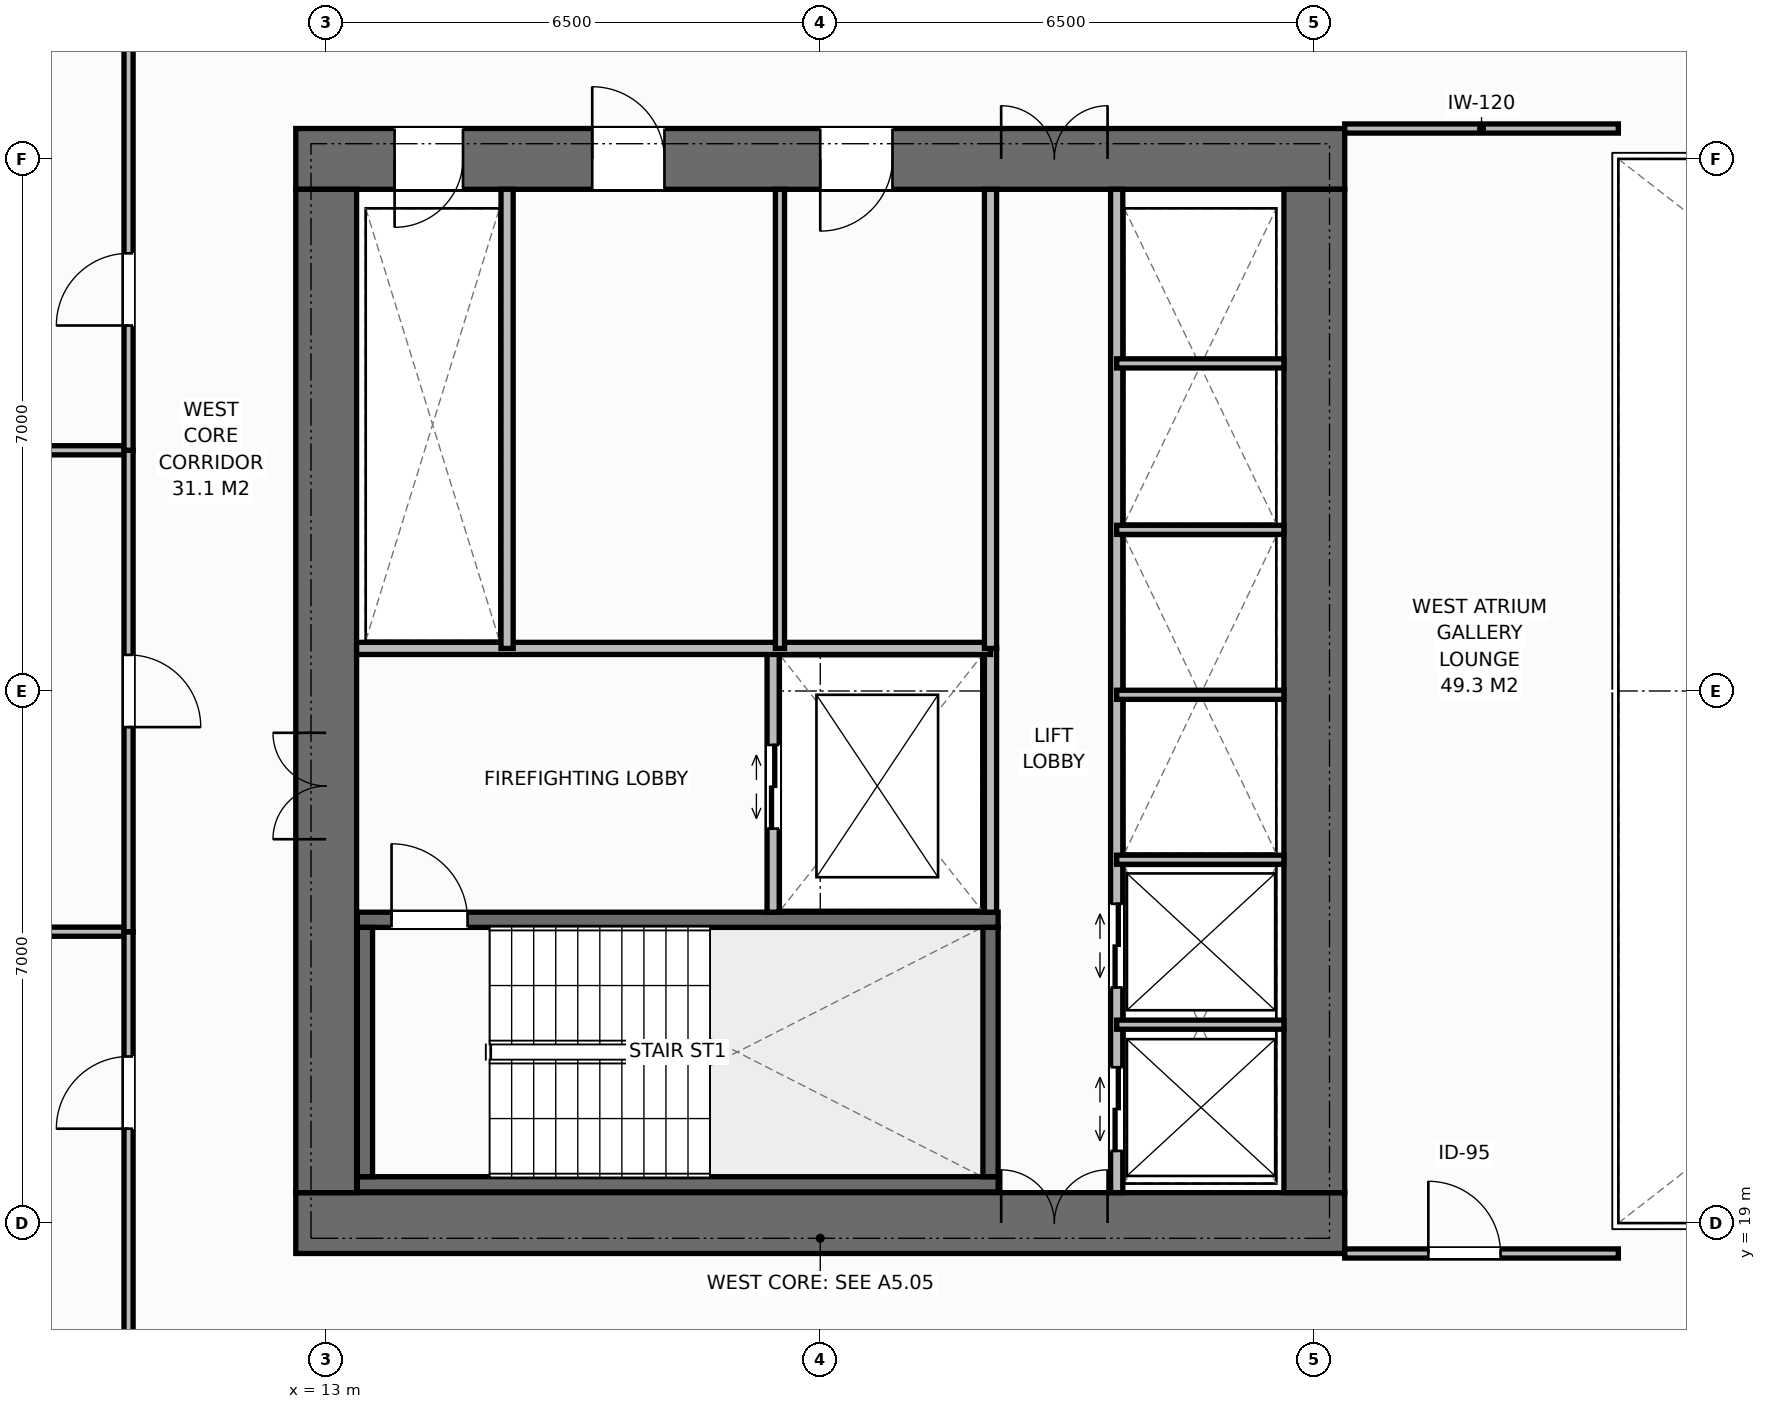
"""IFC4 building model, lengths in metres.
Left out: names, types, materials, properties, quantities, classifications, styles, units other than length and angle.
Written with IfcOpenShell. Run it as: python <this file> out.ifc"""

import sys

from ifc_helpers import new_model, si_unit, direction, frame, frame_2d, origin, place, context, subcontext, project, spatial, rectangle, extrude, element, fill, save


model = new_model("IFC4")
c1 = context("Model", 3, precision=1e-05, world=origin(), true_north=direction((0.0, 1.0)))
c2 = subcontext(c1, "Body", "Model", "MODEL_VIEW")
j1 = project(units=[si_unit("LENGTHUNIT", "METRE"), si_unit("PLANEANGLEUNIT", "RADIAN")], contexts=[c1])
p1 = place(None, origin())
s1 = spatial("IfcSite", under=j1, at=p1, CompositionType="ELEMENT")
p2 = place(p1, origin())
s2 = spatial("IfcBuilding", under=s1, at=p2, CompositionType="ELEMENT")
p3 = place(p2, frame((0.0, 0.0, 50.6)))
s3 = spatial("IfcBuildingStorey", under=s2, at=p3, CompositionType="ELEMENT", Elevation=50.6)
p4 = place(p3, frame((12.6, 19.0, 0.0), z_axis=(0.0, 0.0, 1.0), x_axis=(1.0, 0.0, 0.0)))
e1 = element("IfcWall", 1, at=p4, inside=s3, PredefinedType="SHEAR", context=c2, shape_type="SweptSolid", body=[
    extrude(rectangle(XDim=13.8, YDim=0.8, at=frame_2d((6.9, 0.0))), origin(), (0.0, 0.0, 1.0), 3.8),
])
p5 = place(p4, frame((9.28, 0.0, 0.0)))
e2 = element("IfcOpeningElement", 2, at=p5, cuts=e1, PredefinedType="OPENING", context=c2, shape_type="SweptSolid", body=[
    extrude(rectangle(XDim=1.4, YDim=2.2, at=frame_2d((0.7, 1.1))), frame((0.0, 0.41, 0.0), z_axis=(0.0, -1.0, 0.0), x_axis=(1.0, 0.0, 0.0)), (0.0, 0.0, 1.0), 0.82),
])
p6 = place(p3, frame((12.6, 33.0, 0.0), z_axis=(0.0, 0.0, 1.0), x_axis=(1.0, 0.0, 0.0)))
e3 = element("IfcWall", 3, at=p6, inside=s3, PredefinedType="SHEAR", context=c2, shape_type="SweptSolid", body=[
    extrude(rectangle(XDim=13.8, YDim=0.8, at=frame_2d((6.9, 0.0))), origin(), (0.0, 0.0, 1.0), 3.8),
])
p7 = place(p6, frame((1.3, 0.0, 0.0)))
e4 = element("IfcOpeningElement", 4, at=p7, cuts=e3, PredefinedType="OPENING", context=c2, shape_type="SweptSolid", body=[
    extrude(rectangle(XDim=0.9, YDim=2.15, at=frame_2d((0.45, 1.075))), frame((0.0, 0.41, 0.0), z_axis=(0.0, -1.0, 0.0), x_axis=(1.0, 0.0, 0.0)), (0.0, 0.0, 1.0), 0.82),
])
p8 = place(p6, frame((3.9, 0.0, 0.0)))
e5 = element("IfcOpeningElement", 5, at=p8, cuts=e3, PredefinedType="OPENING", context=c2, shape_type="SweptSolid", body=[
    extrude(rectangle(XDim=0.95, YDim=2.15, at=frame_2d((0.475, 1.075))), frame((0.0, 0.41, 0.0), z_axis=(0.0, -1.0, 0.0), x_axis=(1.0, 0.0, 0.0)), (0.0, 0.0, 1.0), 0.82),
])
p9 = place(p6, frame((6.9, 0.0, 0.0)))
e6 = element("IfcOpeningElement", 6, at=p9, cuts=e3, PredefinedType="OPENING", context=c2, shape_type="SweptSolid", body=[
    extrude(rectangle(XDim=0.95, YDim=2.15, at=frame_2d((0.475, 1.075))), frame((0.0, 0.41, 0.0), z_axis=(0.0, -1.0, 0.0), x_axis=(1.0, 0.0, 0.0)), (0.0, 0.0, 1.0), 0.82),
])
p10 = place(p6, frame((9.28, 0.0, 0.0)))
e7 = element("IfcOpeningElement", 7, at=p10, cuts=e3, PredefinedType="OPENING", context=c2, shape_type="SweptSolid", body=[
    extrude(rectangle(XDim=1.4, YDim=2.2, at=frame_2d((0.7, 1.1))), frame((0.0, 0.41, 0.0), z_axis=(0.0, -1.0, 0.0), x_axis=(1.0, 0.0, 0.0)), (0.0, 0.0, 1.0), 0.82),
])
p11 = place(p3, frame((13.0, 19.4, 0.0), z_axis=(0.0, 0.0, 1.0), x_axis=(0.0, 1.0, 0.0)))
e8 = element("IfcWall", 8, at=p11, inside=s3, PredefinedType="SHEAR", context=c2, shape_type="SweptSolid", body=[
    extrude(rectangle(XDim=13.2, YDim=0.8, at=frame_2d((6.6, 0.0))), origin(), (0.0, 0.0, 1.0), 3.8),
])
p12 = place(p11, frame((4.65, 0.0, 0.0)))
e9 = element("IfcOpeningElement", 9, at=p12, cuts=e8, PredefinedType="OPENING", context=c2, shape_type="SweptSolid", body=[
    extrude(rectangle(XDim=1.4, YDim=2.2, at=frame_2d((0.7, 1.1))), frame((0.0, 0.41, 0.0), z_axis=(0.0, -1.0, 0.0), x_axis=(1.0, 0.0, 0.0)), (0.0, 0.0, 1.0), 0.82),
])
p13 = place(p3, frame((26.0, 19.4, 0.0), z_axis=(0.0, 0.0, 1.0), x_axis=(0.0, 1.0, 0.0)))
e10 = element("IfcWall", 10, at=p13, inside=s3, PredefinedType="SHEAR", context=c2, shape_type="SweptSolid", body=[
    extrude(rectangle(XDim=13.2, YDim=0.8, at=frame_2d((6.6, 0.0))), origin(), (0.0, 0.0, 1.0), 3.8),
])
p14 = place(p3, frame((13.41, 19.51, 0.0), z_axis=(0.0, 0.0, 1.0), x_axis=(1.0, 0.0, 0.0)))
e11 = element("IfcWall", 11, at=p14, inside=s3, PredefinedType="SHEAR", context=c2, shape_type="SweptSolid", body=[
    extrude(rectangle(XDim=8.43, YDim=0.2, at=frame_2d((4.215, 0.0))), origin(), (0.0, 0.0, 1.0), 3.8),
])
p15 = place(p3, frame((13.41, 22.99, 0.0), z_axis=(0.0, 0.0, 1.0), x_axis=(1.0, 0.0, 0.0)))
e12 = element("IfcWall", 12, at=p15, inside=s3, PredefinedType="SHEAR", context=c2, shape_type="SweptSolid", body=[
    extrude(rectangle(XDim=8.43, YDim=0.2, at=frame_2d((4.215, 0.0))), origin(), (0.0, 0.0, 1.0), 3.8),
])
p16 = place(p15, frame((0.45, 0.0, 0.0)))
e13 = element("IfcOpeningElement", 13, at=p16, cuts=e12, PredefinedType="OPENING", context=c2, shape_type="SweptSolid", body=[
    extrude(rectangle(XDim=1.0, YDim=2.15, at=frame_2d((0.5, 1.075))), frame((0.0, 0.11, 0.0), z_axis=(0.0, -1.0, 0.0), x_axis=(1.0, 0.0, 0.0)), (0.0, 0.0, 1.0), 0.22),
])
for number, where, z_axis, x_axis in (
    (14, (13.51, 19.61, 0.0), (0.0, 0.0, 1.0), (0.0, 1.0, 0.0)),
    (15, (21.74, 19.61, 0.0), (0.0, 0.0, 1.0), (0.0, 1.0, 0.0)),
):
    element("IfcWall", number, at=place(p3, frame(where, z_axis=z_axis, x_axis=x_axis)), inside=s3, PredefinedType="SHEAR", context=c2, shape_type="SweptSolid", body=[
        extrude(rectangle(XDim=3.28, YDim=0.2, at=frame_2d((1.64, 0.0))), origin(), (0.0, 0.0, 1.0), 3.8),
    ])
p17 = place(p3, frame((21.74, 23.09, 0.0), z_axis=(0.0, 0.0, 1.0), x_axis=(0.0, 1.0, 0.0)))
e16 = element("IfcWall", 16, at=p17, inside=s3, PredefinedType="STANDARD", context=c2, shape_type="SweptSolid", body=[
    extrude(rectangle(XDim=3.47, YDim=0.16, at=frame_2d((1.735, 0.0))), origin(), (0.0, 0.0, 1.0), 3.55),
])
p18 = place(p3, frame((18.88, 23.09, 0.0), z_axis=(0.0, 0.0, 1.0), x_axis=(0.0, 1.0, 0.0)))
e17 = element("IfcWall", 17, at=p18, inside=s3, PredefinedType="STANDARD", context=c2, shape_type="SweptSolid", body=[
    extrude(rectangle(XDim=3.47, YDim=0.16, at=frame_2d((1.735, 0.0))), origin(), (0.0, 0.0, 1.0), 3.55),
])
p19 = place(p18, frame((1.1, 0.0, 0.0)))
e18 = element("IfcOpeningElement", 18, at=p19, cuts=e17, PredefinedType="OPENING", context=c2, shape_type="SweptSolid", body=[
    extrude(rectangle(XDim=1.1, YDim=2.2, at=frame_2d((0.55, 1.1))), frame((0.0, 0.09, 0.0), z_axis=(0.0, -1.0, 0.0), x_axis=(1.0, 0.0, 0.0)), (0.0, 0.0, 1.0), 0.18),
])
p20 = place(p3, frame((13.4, 26.56, 0.0), z_axis=(0.0, 0.0, 1.0), x_axis=(1.0, 0.0, 0.0)))
e19 = element("IfcWall", 19, at=p20, inside=s3, PredefinedType="STANDARD", context=c2, shape_type="SweptSolid", body=[
    extrude(rectangle(XDim=8.34, YDim=0.16, at=frame_2d((4.17, 0.0))), origin(), (0.0, 0.0, 1.0), 3.55),
])
p21 = place(p3, frame((15.38, 26.56, 0.0), z_axis=(0.0, 0.0, 1.0), x_axis=(0.0, 1.0, 0.0)))
e20 = element("IfcWall", 20, at=p21, inside=s3, PredefinedType="STANDARD", context=c2, shape_type="SweptSolid", body=[
    extrude(rectangle(XDim=6.04, YDim=0.16, at=frame_2d((3.02, 0.0))), origin(), (0.0, 0.0, 1.0), 3.55),
])
p22 = place(p3, frame((18.97, 26.56, 0.0), z_axis=(0.0, 0.0, 1.0), x_axis=(0.0, 1.0, 0.0)))
e21 = element("IfcWall", 21, at=p22, inside=s3, PredefinedType="PARTITIONING", context=c2, shape_type="SweptSolid", body=[
    extrude(rectangle(XDim=6.04, YDim=0.12, at=frame_2d((3.02, 0.0))), origin(), (0.0, 0.0, 1.0), 3.55),
])
p23 = place(p3, frame((21.74, 26.56, 0.0), z_axis=(0.0, 0.0, 1.0), x_axis=(0.0, 1.0, 0.0)))
e22 = element("IfcWall", 22, at=p23, inside=s3, PredefinedType="STANDARD", context=c2, shape_type="SweptSolid", body=[
    extrude(rectangle(XDim=6.04, YDim=0.16, at=frame_2d((3.02, 0.0))), origin(), (0.0, 0.0, 1.0), 3.55),
])
p24 = place(p3, frame((23.4, 19.4, 0.0), z_axis=(0.0, 0.0, 1.0), x_axis=(0.0, 1.0, 0.0)))
e23 = element("IfcWall", 23, at=p24, inside=s3, PredefinedType="STANDARD", context=c2, shape_type="SweptSolid", body=[
    extrude(rectangle(XDim=13.2, YDim=0.16, at=frame_2d((6.6, 0.0))), origin(), (0.0, 0.0, 1.0), 3.55),
])
p25 = place(p24, frame((0.55, 0.0, 0.0)))
e24 = element("IfcOpeningElement", 24, at=p25, cuts=e23, PredefinedType="OPENING", context=c2, shape_type="SweptSolid", body=[
    extrude(rectangle(XDim=1.1, YDim=2.2, at=frame_2d((0.55, 1.1))), frame((0.0, 0.09, 0.0), z_axis=(0.0, -1.0, 0.0), x_axis=(1.0, 0.0, 0.0)), (0.0, 0.0, 1.0), 0.18),
])
p26 = place(p24, frame((2.7, 0.0, 0.0)))
e25 = element("IfcOpeningElement", 25, at=p26, cuts=e23, PredefinedType="OPENING", context=c2, shape_type="SweptSolid", body=[
    extrude(rectangle(XDim=1.1, YDim=2.2, at=frame_2d((0.55, 1.1))), frame((0.0, 0.09, 0.0), z_axis=(0.0, -1.0, 0.0), x_axis=(1.0, 0.0, 0.0)), (0.0, 0.0, 1.0), 0.18),
])
for number, where, z_axis, x_axis in (
    (26, (23.4, 21.61, 0.0), (0.0, 0.0, 1.0), (1.0, 0.0, 0.0)),
    (27, (23.4, 23.78, 0.0), (0.0, 0.0, 1.0), (1.0, 0.0, 0.0)),
    (28, (23.4, 25.95, 0.0), (0.0, 0.0, 1.0), (1.0, 0.0, 0.0)),
    (29, (23.4, 28.12, 0.0), (0.0, 0.0, 1.0), (1.0, 0.0, 0.0)),
    (30, (23.4, 30.31, 0.0), (0.0, 0.0, 1.0), (1.0, 0.0, 0.0)),
):
    element("IfcWall", number, at=place(p3, frame(where, z_axis=z_axis, x_axis=x_axis)), inside=s3, PredefinedType="PARTITIONING", context=c2, shape_type="SweptSolid", body=[
        extrude(rectangle(XDim=2.2, YDim=0.12, at=frame_2d((1.1, 0.0))), origin(), (0.0, 0.0, 1.0), 3.55),
    ])
p27 = place(p3, frame((26.4, 33.4, 0.0), z_axis=(0.0, 0.0, 1.0), x_axis=(1.0, 0.0, 0.0)))
e31 = element("IfcWall", 31, at=p27, inside=s3, PredefinedType="PARTITIONING", context=c2, shape_type="SweptSolid", body=[
    extrude(rectangle(XDim=3.6, YDim=0.12, at=frame_2d((1.8, 0.0))), origin(), (0.0, 0.0, 1.0), 3.55),
])
p28 = place(p3, frame((26.4, 18.6, 0.0), z_axis=(0.0, 0.0, 1.0), x_axis=(1.0, 0.0, 0.0)))
e32 = element("IfcWall", 32, at=p28, inside=s3, PredefinedType="PARTITIONING", context=c2, shape_type="SweptSolid", body=[
    extrude(rectangle(XDim=3.6, YDim=0.12, at=frame_2d((1.8, 0.0))), origin(), (0.0, 0.0, 1.0), 3.55),
])
p29 = place(p28, frame((1.1, 0.0, 0.0)))
e33 = element("IfcOpeningElement", 33, at=p29, cuts=e32, PredefinedType="OPENING", context=c2, shape_type="SweptSolid", body=[
    extrude(rectangle(XDim=0.95, YDim=2.15, at=frame_2d((0.475, 1.075))), frame((0.0, 0.07, 0.0), z_axis=(0.0, -1.0, 0.0), x_axis=(1.0, 0.0, 0.0)), (0.0, 0.0, 1.0), 0.14),
])
p30 = place(p3, frame((-0.18, 22.833, 0.0), z_axis=(0.0, 0.0, 1.0), x_axis=(1.0, 0.0, 0.0)))
e34 = element("IfcWall", 34, at=p30, inside=s3, PredefinedType="PARTITIONING", context=c2, shape_type="SweptSolid", body=[
    extrude(rectangle(XDim=10.58, YDim=0.12, at=frame_2d((5.29, 0.0))), origin(), (0.0, 0.0, 1.0), 3.55),
])
p31 = place(p3, frame((10.4, 16.5, 0.0), z_axis=(0.0, 0.0, 1.0), x_axis=(0.0, 1.0, 0.0)))
e35 = element("IfcWall", 35, at=p31, inside=s3, PredefinedType="PARTITIONING", context=c2, shape_type="SweptSolid", body=[
    extrude(rectangle(XDim=6.333, YDim=0.12, at=frame_2d((3.167, 0.0))), origin(), (0.0, 0.0, 1.0), 3.55),
])
p32 = place(p31, frame((3.742, 0.0, 0.0)))
e36 = element("IfcOpeningElement", 36, at=p32, cuts=e35, PredefinedType="OPENING", context=c2, shape_type="SweptSolid", body=[
    extrude(rectangle(XDim=0.95, YDim=2.15, at=frame_2d((0.475, 1.075))), frame((0.0, 0.07, 0.0), z_axis=(0.0, -1.0, 0.0), x_axis=(1.0, 0.0, 0.0)), (0.0, 0.0, 1.0), 0.14),
])
p33 = place(p3, frame((-0.18, 29.167, 0.0), z_axis=(0.0, 0.0, 1.0), x_axis=(1.0, 0.0, 0.0)))
e37 = element("IfcWall", 37, at=p33, inside=s3, PredefinedType="PARTITIONING", context=c2, shape_type="SweptSolid", body=[
    extrude(rectangle(XDim=10.58, YDim=0.12, at=frame_2d((5.29, 0.0))), origin(), (0.0, 0.0, 1.0), 3.55),
])
p34 = place(p3, frame((10.4, 22.833, 0.0), z_axis=(0.0, 0.0, 1.0), x_axis=(0.0, 1.0, 0.0)))
e38 = element("IfcWall", 38, at=p34, inside=s3, PredefinedType="PARTITIONING", context=c2, shape_type="SweptSolid", body=[
    extrude(rectangle(XDim=6.333, YDim=0.12, at=frame_2d((3.167, 0.0))), origin(), (0.0, 0.0, 1.0), 3.55),
])
p35 = place(p34, frame((2.692, 0.0, 0.0)))
e39 = element("IfcOpeningElement", 39, at=p35, cuts=e38, PredefinedType="OPENING", context=c2, shape_type="SweptSolid", body=[
    extrude(rectangle(XDim=0.95, YDim=2.15, at=frame_2d((0.475, 1.075))), frame((0.0, 0.07, 0.0), z_axis=(0.0, -1.0, 0.0), x_axis=(1.0, 0.0, 0.0)), (0.0, 0.0, 1.0), 0.14),
])
p36 = place(p3, frame((10.4, 29.167, 0.0), z_axis=(0.0, 0.0, 1.0), x_axis=(0.0, 1.0, 0.0)))
e40 = element("IfcWall", 40, at=p36, inside=s3, PredefinedType="PARTITIONING", context=c2, shape_type="SweptSolid", body=[
    extrude(rectangle(XDim=6.333, YDim=0.12, at=frame_2d((3.167, 0.0))), origin(), (0.0, 0.0, 1.0), 3.55),
])
p37 = place(p36, frame((1.642, 0.0, 0.0)))
e41 = element("IfcOpeningElement", 41, at=p37, cuts=e40, PredefinedType="OPENING", context=c2, shape_type="SweptSolid", body=[
    extrude(rectangle(XDim=0.95, YDim=2.15, at=frame_2d((0.475, 1.075))), frame((0.0, 0.07, 0.0), z_axis=(0.0, -1.0, 0.0), x_axis=(1.0, 0.0, 0.0)), (0.0, 0.0, 1.0), 0.14),
])
p38 = place(p16, origin())
e42 = element("IfcDoor", 42, at=p38, inside=s3, OperationType="SINGLE_SWING_LEFT", PredefinedType="DOOR", context=c2, shape_type="SweptSolid", body=[
    extrude(rectangle(XDim=1.0, YDim=2.15, at=frame_2d((0.5, 1.075))), frame((0.0, 0.025, 0.0), z_axis=(0.0, -1.0, 0.0), x_axis=(1.0, 0.0, 0.0)), (0.0, 0.0, 1.0), 0.05),
])
fill(e13, e42)
p39 = place(p12, origin())
e43 = element("IfcDoor", 43, at=p39, inside=s3, OperationType="DOUBLE_DOOR_SINGLE_SWING", PredefinedType="DOOR", context=c2, shape_type="SweptSolid", body=[
    extrude(rectangle(XDim=1.4, YDim=2.2, at=frame_2d((0.7, 1.1))), frame((0.0, 0.025, 0.0), z_axis=(0.0, -1.0, 0.0), x_axis=(1.0, 0.0, 0.0)), (0.0, 0.0, 1.0), 0.05),
])
fill(e9, e43)
p40 = place(p19, origin())
e44 = element("IfcDoor", 44, at=p40, inside=s3, OperationType="DOUBLE_DOOR_SLIDING", PredefinedType="DOOR", context=c2, shape_type="SweptSolid", body=[
    extrude(rectangle(XDim=1.1, YDim=2.2, at=frame_2d((0.55, 1.1))), frame((0.0, 0.025, 0.0), z_axis=(0.0, -1.0, 0.0), x_axis=(1.0, 0.0, 0.0)), (0.0, 0.0, 1.0), 0.05),
])
fill(e18, e44)
p41 = place(p7, origin())
e45 = element("IfcDoor", 45, at=p41, inside=s3, OperationType="SINGLE_SWING_RIGHT", PredefinedType="DOOR", context=c2, shape_type="SweptSolid", body=[
    extrude(rectangle(XDim=0.9, YDim=2.15, at=frame_2d((0.45, 1.075))), frame((0.0, -0.075, 0.0), z_axis=(0.0, -1.0, 0.0), x_axis=(1.0, 0.0, 0.0)), (0.0, 0.0, 1.0), 0.05),
])
fill(e4, e45)
p42 = place(p8, origin())
e46 = element("IfcDoor", 46, at=p42, inside=s3, OperationType="SINGLE_SWING_LEFT", PredefinedType="DOOR", context=c2, shape_type="SweptSolid", body=[
    extrude(rectangle(XDim=0.95, YDim=2.15, at=frame_2d((0.475, 1.075))), frame((0.0, -0.075, 0.0), z_axis=(0.0, -1.0, 0.0), x_axis=(1.0, 0.0, 0.0)), (0.0, 0.0, 1.0), 0.05),
])
fill(e5, e46)
p43 = place(p9, origin())
e47 = element("IfcDoor", 47, at=p43, inside=s3, OperationType="SINGLE_SWING_RIGHT", PredefinedType="DOOR", context=c2, shape_type="SweptSolid", body=[
    extrude(rectangle(XDim=0.95, YDim=2.15, at=frame_2d((0.475, 1.075))), frame((0.0, -0.075, 0.0), z_axis=(0.0, -1.0, 0.0), x_axis=(1.0, 0.0, 0.0)), (0.0, 0.0, 1.0), 0.05),
])
fill(e6, e47)
p44 = place(p5, origin())
e48 = element("IfcDoor", 48, at=p44, inside=s3, OperationType="DOUBLE_DOOR_SINGLE_SWING", PredefinedType="DOOR", context=c2, shape_type="SweptSolid", body=[
    extrude(rectangle(XDim=1.4, YDim=2.2, at=frame_2d((0.7, 1.1))), frame((0.0, 0.125, 0.0), z_axis=(0.0, -1.0, 0.0), x_axis=(1.0, 0.0, 0.0)), (0.0, 0.0, 1.0), 0.05),
])
fill(e2, e48)
p45 = place(p10, origin())
e49 = element("IfcDoor", 49, at=p45, inside=s3, OperationType="DOUBLE_DOOR_SINGLE_SWING", PredefinedType="DOOR", context=c2, shape_type="SweptSolid", body=[
    extrude(rectangle(XDim=1.4, YDim=2.2, at=frame_2d((0.7, 1.1))), frame((0.0, -0.075, 0.0), z_axis=(0.0, -1.0, 0.0), x_axis=(1.0, 0.0, 0.0)), (0.0, 0.0, 1.0), 0.05),
])
fill(e7, e49)
p46 = place(p25, origin())
e50 = element("IfcDoor", 50, at=p46, inside=s3, OperationType="DOUBLE_DOOR_SLIDING", PredefinedType="DOOR", context=c2, shape_type="SweptSolid", body=[
    extrude(rectangle(XDim=1.1, YDim=2.2, at=frame_2d((0.55, 1.1))), frame((0.0, 0.025, 0.0), z_axis=(0.0, -1.0, 0.0), x_axis=(1.0, 0.0, 0.0)), (0.0, 0.0, 1.0), 0.05),
])
fill(e24, e50)
p47 = place(p26, origin())
e51 = element("IfcDoor", 51, at=p47, inside=s3, OperationType="DOUBLE_DOOR_SLIDING", PredefinedType="DOOR", context=c2, shape_type="SweptSolid", body=[
    extrude(rectangle(XDim=1.1, YDim=2.2, at=frame_2d((0.55, 1.1))), frame((0.0, 0.025, 0.0), z_axis=(0.0, -1.0, 0.0), x_axis=(1.0, 0.0, 0.0)), (0.0, 0.0, 1.0), 0.05),
])
fill(e25, e51)
p48 = place(p29, origin())
e52 = element("IfcDoor", 52, at=p48, inside=s3, OperationType="SINGLE_SWING_LEFT", PredefinedType="DOOR", context=c2, shape_type="SweptSolid", body=[
    extrude(rectangle(XDim=0.95, YDim=2.15, at=frame_2d((0.475, 1.075))), frame((0.0, 0.025, 0.0), z_axis=(0.0, -1.0, 0.0), x_axis=(1.0, 0.0, 0.0)), (0.0, 0.0, 1.0), 0.05),
])
fill(e33, e52)
p49 = place(p32, origin())
e53 = element("IfcDoor", 53, at=p49, inside=s3, OperationType="SINGLE_SWING_LEFT", PredefinedType="DOOR", context=c2, shape_type="SweptSolid", body=[
    extrude(rectangle(XDim=0.95, YDim=2.15, at=frame_2d((0.475, 1.075))), frame((0.0, 0.025, 0.0), z_axis=(0.0, -1.0, 0.0), x_axis=(1.0, 0.0, 0.0)), (0.0, 0.0, 1.0), 0.05),
])
fill(e36, e53)
p50 = place(p35, origin())
e54 = element("IfcDoor", 54, at=p50, inside=s3, OperationType="SINGLE_SWING_RIGHT", PredefinedType="DOOR", context=c2, shape_type="SweptSolid", body=[
    extrude(rectangle(XDim=0.95, YDim=2.15, at=frame_2d((0.475, 1.075))), frame((0.0, 0.025, 0.0), z_axis=(0.0, -1.0, 0.0), x_axis=(1.0, 0.0, 0.0)), (0.0, 0.0, 1.0), 0.05),
])
fill(e39, e54)
p51 = place(p37, origin())
e55 = element("IfcDoor", 55, at=p51, inside=s3, OperationType="SINGLE_SWING_LEFT", PredefinedType="DOOR", context=c2, shape_type="SweptSolid", body=[
    extrude(rectangle(XDim=0.95, YDim=2.15, at=frame_2d((0.475, 1.075))), frame((0.0, 0.025, 0.0), z_axis=(0.0, -1.0, 0.0), x_axis=(1.0, 0.0, 0.0)), (0.0, 0.0, 1.0), 0.05),
])
fill(e41, e55)
save(model, sys.argv[1])
